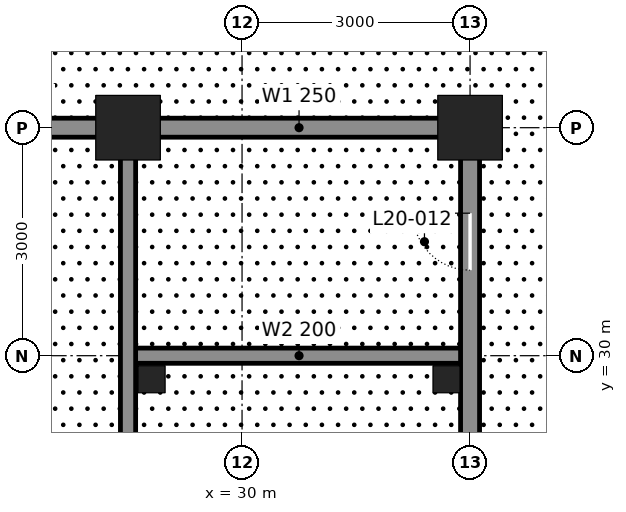
"""IFC4 building model, lengths in metres.
Left out: names, types, materials, properties, quantities, classifications, styles, units other than length and angle.
Written with IfcOpenShell. Run it as: python <this file> out.ifc"""

import sys

from ifc_helpers import new_model, si_unit, direction, frame, frame_2d, origin, origin_2d, place, context, subcontext, project, spatial, rectangle, hollow_rectangle, extrude, element, fill, save


model = new_model("IFC4")
c1 = context("Model", 3, precision=1e-05, world=origin(), true_north=direction((0.0, 1.0)))
c2 = subcontext(c1, "Body", "Model", "MODEL_VIEW")
j1 = project(units=[si_unit("LENGTHUNIT", "METRE"), si_unit("PLANEANGLEUNIT", "RADIAN")], contexts=[c1])
p1 = place(None, origin())
s1 = spatial("IfcSite", under=j1, at=p1, CompositionType="ELEMENT")
p2 = place(p1, origin())
s2 = spatial("IfcBuilding", under=s1, at=p2, CompositionType="ELEMENT")
p3 = place(p2, frame((0.0, 0.0, 96.3)))
s3 = spatial("IfcBuildingStorey", under=s2, at=p3, CompositionType="ELEMENT", Elevation=96.3)
for number, where, z_axis, x_axis in (
    (1, (28.5, 33.0, 0.0), (0.0, 0.0, 1.0), (1.0, 0.0, 0.0)),
    (2, (33.0, 33.0, 0.0), (0.0, 0.0, 1.0), (1.0, 0.0, 0.0)),
):
    element("IfcColumn", number, at=place(p3, frame(where, z_axis=z_axis, x_axis=x_axis)), inside=s3, PredefinedType="COLUMN", context=c2, shape_type="SweptSolid", body=[
        extrude(hollow_rectangle(XDim=0.85, YDim=0.85, WallThickness=0.085, at=origin_2d()), origin(), (0.0, 0.0, 1.0), 6.0),
    ])
p4 = place(p3, frame((28.5, 30.0, 0.0), z_axis=(0.0, 0.0, 1.0), x_axis=(1.0, 0.0, 0.0)))
e3 = element("IfcWall", 3, at=p4, inside=s3, PredefinedType="SOLIDWALL", context=c2, shape_type="SweptSolid", body=[
    extrude(rectangle(XDim=4.5, YDim=0.2, at=frame_2d((2.25, 0.0))), origin(), (0.0, 0.0, 1.0), 5.84),
])
p5 = place(p3, frame((25.75, 33.0, 0.0), z_axis=(0.0, 0.0, 1.0), x_axis=(1.0, 0.0, 0.0)))
e4 = element("IfcWall", 4, at=p5, inside=s3, PredefinedType="SOLIDWALL", context=c2, shape_type="SweptSolid", body=[
    extrude(rectangle(XDim=2.5, YDim=0.25, at=frame_2d((1.25, 0.0))), origin(), (0.0, 0.0, 1.0), 4.981),
])
p6 = place(p3, frame((28.75, 33.0, 0.0), z_axis=(0.0, 0.0, 1.0), x_axis=(1.0, 0.0, 0.0)))
e5 = element("IfcWall", 5, at=p6, inside=s3, PredefinedType="SOLIDWALL", context=c2, shape_type="SweptSolid", body=[
    extrude(rectangle(XDim=4.0, YDim=0.25, at=frame_2d((2.0, 0.0))), origin(), (0.0, 0.0, 1.0), 4.981),
])
p7 = place(p3, frame((28.5, 24.25, 0.0), z_axis=(0.0, 0.0, 1.0), x_axis=(0.0, 1.0, 0.0)))
e6 = element("IfcWall", 6, at=p7, inside=s3, PredefinedType="SOLIDWALL", context=c2, shape_type="SweptSolid", body=[
    extrude(rectangle(XDim=8.5, YDim=0.2, at=frame_2d((4.25, 0.0))), origin(), (0.0, 0.0, 1.0), 4.913),
])
p8 = place(p3, frame((33.0, 24.25, 0.0), z_axis=(0.0, 0.0, 1.0), x_axis=(0.0, 1.0, 0.0)))
e7 = element("IfcWall", 7, at=p8, inside=s3, PredefinedType="SOLIDWALL", context=c2, shape_type="SweptSolid", body=[
    extrude(rectangle(XDim=8.5, YDim=0.25, at=frame_2d((4.25, 0.0))), origin(), (0.0, 0.0, 1.0), 4.913),
])
p9 = place(p8, frame((6.875, 0.0, 0.0)))
e8 = element("IfcOpeningElement", 8, at=p9, cuts=e7, PredefinedType="OPENING", context=c2, shape_type="SweptSolid", body=[
    extrude(rectangle(XDim=0.75, YDim=2.1, at=frame_2d((0.375, 1.05))), frame((0.0, 0.135, 0.0), z_axis=(0.0, -1.0, 0.0), x_axis=(1.0, 0.0, 0.0)), (0.0, 0.0, 1.0), 0.27),
])
for number, where, z_axis, x_axis in (
    (9, (28.81, 29.69, 0.0), (0.0, 0.0, 1.0), (1.0, 0.0, 0.0)),
    (10, (32.69, 29.69, 0.0), (0.0, 0.0, 1.0), (1.0, 0.0, 0.0)),
):
    element("IfcColumn", number, at=place(p3, frame(where, z_axis=z_axis, x_axis=x_axis)), inside=s3, PredefinedType="COLUMN", context=c2, shape_type="SweptSolid", body=[
        extrude(hollow_rectangle(XDim=0.356, YDim=0.356, WallThickness=0.015, at=origin_2d()), origin(), (0.0, 0.0, 1.0), 6.0),
    ])
p10 = place(p9, origin())
e11 = element("IfcDoor", 11, at=p10, inside=s3, OperationType="SINGLE_SWING_RIGHT", PredefinedType="DOOR", context=c2, shape_type="SweptSolid", body=[
    extrude(rectangle(XDim=0.75, YDim=2.1, at=frame_2d((0.375, 1.05))), frame((0.0, 0.025, 0.0), z_axis=(0.0, -1.0, 0.0), x_axis=(1.0, 0.0, 0.0)), (0.0, 0.0, 1.0), 0.05),
])
fill(e8, e11)
save(model, sys.argv[1])
